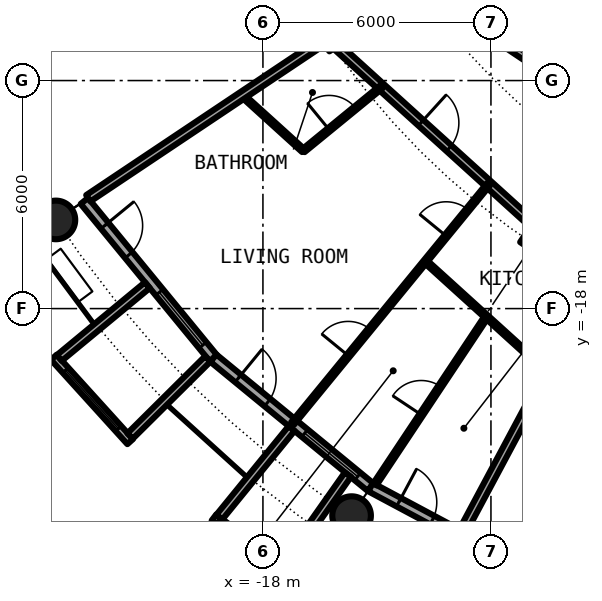
"""IFC4 building model, lengths in metres.
Left out: names, types, materials, properties, quantities, classifications, styles, units other than length and angle.
Written with IfcOpenShell. Run it as: python <this file> out.ifc"""

import sys

from ifc_helpers import new_model, si_unit, direction, frame, frame_2d, origin, origin_2d, place, context, subcontext, project, spatial, rectangle, circle, hollow_circle, i_section, extrude, element, fill, save


model = new_model("IFC4")
c1 = context("Model", 3, precision=1e-05, world=origin(), true_north=direction((0.0, 1.0)))
c2 = subcontext(c1, "Body", "Model", "MODEL_VIEW")
j1 = project(units=[si_unit("LENGTHUNIT", "METRE"), si_unit("PLANEANGLEUNIT", "RADIAN")], contexts=[c1])
p1 = place(None, origin())
s1 = spatial("IfcSite", under=j1, at=p1, CompositionType="ELEMENT")
p2 = place(p1, origin())
s2 = spatial("IfcBuilding", under=s1, at=p2, CompositionType="ELEMENT")
p3 = place(p2, frame((0.0, 0.0, 31.95)))
s3 = spatial("IfcBuildingStorey", under=s2, at=p3, CompositionType="ELEMENT", Elevation=31.95)
for number, where, z_axis, x_axis in (
    (1, (-23.448, -15.667, 0.0), (0.0, 0.0, 1.0), (1.0, 0.0, 0.0)),
    (2, (-15.667, -23.448, 0.0), (0.0, 0.0, 1.0), (1.0, 0.0, 0.0)),
):
    element("IfcColumn", number, at=place(p3, frame(where, z_axis=z_axis, x_axis=x_axis)), inside=s3, PredefinedType="COLUMN", context=c2, shape_type="SweptSolid", body=[
        extrude(hollow_circle(Radius=0.508, WallThickness=0.05, at=origin_2d()), origin(), (0.0, 0.0, 1.0), 3.05),
    ])
p4 = place(p3, frame((-10.889, -16.297, 0.0), z_axis=(0.0, 0.0, 1.0), x_axis=(-0.55557023302, -0.831469612303, 0.0)))
e3 = element("IfcColumn", 3, at=p4, inside=s3, PredefinedType="COLUMN", context=c2, shape_type="SweptSolid", body=[
    extrude(i_section(OverallWidth=0.305, OverallDepth=0.62, WebThickness=0.021, FlangeThickness=0.04, FilletRadius=0.027, at=origin_2d()), origin(), (0.0, 0.0, 1.0), 3.05),
])
p5 = place(p3, frame((-22.699, -15.167, 0.0), z_axis=(0.0, 0.0, 1.0), x_axis=(0.634382322723, -0.773019449054, 0.0)))
e4 = element("IfcWall", 4, at=p5, inside=s3, PredefinedType="SOLIDWALL", context=c2, shape_type="SweptSolid", body=[
    extrude(rectangle(XDim=5.352, YDim=0.25, at=frame_2d((2.676, 0.0))), origin(), (0.0, 0.0, 1.0), 2.7),
])
p6 = place(p5, frame((0.841, 0.0, 0.0)))
e5 = element("IfcOpeningElement", 5, at=p6, cuts=e4, PredefinedType="OPENING", context=c2, shape_type="SweptSolid", body=[
    extrude(rectangle(XDim=1.0, YDim=2.2, at=frame_2d((0.5, 1.1))), frame((0.0, 0.135, 0.0), z_axis=(0.0, -1.0, 0.0), x_axis=(1.0, 0.0, 0.0)), (0.0, 0.0, 1.0), 0.27),
])
p7 = place(p5, frame((3.111, 0.0, 0.3)))
e6 = element("IfcOpeningElement", 6, at=p7, cuts=e4, PredefinedType="OPENING", context=c2, shape_type="SweptSolid", body=[
    extrude(rectangle(XDim=1.8, YDim=2.1, at=frame_2d((0.9, 1.05))), frame((0.0, 0.135, 0.0), z_axis=(0.0, -1.0, 0.0), x_axis=(1.0, 0.0, 0.0)), (0.0, 0.0, 1.0), 0.27),
])
p8 = place(p3, frame((-23.503, -19.282, -0.03), z_axis=(0.0, 0.0, 1.0), x_axis=(0.671506829416, -0.740998365753, 0.0)))
e7 = element("IfcWall", 7, at=p8, inside=s3, PredefinedType="SOLIDWALL", context=c2, shape_type="SweptSolid", body=[
    extrude(rectangle(XDim=2.993, YDim=0.2, at=frame_2d((1.497, 0.0))), origin(), (0.0, 0.0, 1.0), 2.73),
])
p9 = place(p8, frame((0.457, 0.0, 0.33)))
e8 = element("IfcOpeningElement", 8, at=p9, cuts=e7, PredefinedType="OPENING", context=c2, shape_type="SweptSolid", body=[
    extrude(circle(Radius=1.04, at=frame_2d((1.04, 1.04))), frame((0.0, 0.11, 0.0), z_axis=(0.0, -1.0, 0.0), x_axis=(1.0, 0.0, 0.0)), (0.0, 0.0, 1.0), 0.22),
])
p10 = place(p3, frame((-21.041, -17.384, -0.03), z_axis=(0.0, 0.0, 1.0), x_axis=(-0.770784861449, -0.63709551667, 0.0)))
e9 = element("IfcWall", 9, at=p10, inside=s3, PredefinedType="SOLIDWALL", context=c2, shape_type="SweptSolid", body=[
    extrude(rectangle(XDim=3.006, YDim=0.2, at=frame_2d((1.503, 0.0))), origin(), (0.0, 0.0, 1.0), 2.73),
])
p11 = place(p3, frame((-19.45, -19.323, -0.03), z_axis=(0.0, 0.0, 1.0), x_axis=(-0.709727076896, -0.704476739375, 0.0)))
e10 = element("IfcWall", 10, at=p11, inside=s3, PredefinedType="SOLIDWALL", context=c2, shape_type="SweptSolid", body=[
    extrude(rectangle(XDim=2.883, YDim=0.2, at=frame_2d((1.441, 0.0))), origin(), (0.0, 0.0, 1.0), 2.73),
])
p12 = place(p3, frame((-19.304, -19.304, 0.0), z_axis=(0.0, 0.0, 1.0), x_axis=(0.773019449054, -0.634382322723, 0.0)))
e11 = element("IfcWall", 11, at=p12, inside=s3, PredefinedType="SOLIDWALL", context=c2, shape_type="SweptSolid", body=[
    extrude(rectangle(XDim=5.352, YDim=0.25, at=frame_2d((2.676, 0.0))), origin(), (0.0, 0.0, 1.0), 2.7),
])
p13 = place(p12, frame((0.841, 0.0, 0.0)))
e12 = element("IfcOpeningElement", 12, at=p13, cuts=e11, PredefinedType="OPENING", context=c2, shape_type="SweptSolid", body=[
    extrude(rectangle(XDim=1.0, YDim=2.2, at=frame_2d((0.5, 1.1))), frame((0.0, 0.135, 0.0), z_axis=(0.0, -1.0, 0.0), x_axis=(1.0, 0.0, 0.0)), (0.0, 0.0, 1.0), 0.27),
])
p14 = place(p12, frame((3.111, 0.0, 0.3)))
e13 = element("IfcOpeningElement", 13, at=p14, cuts=e11, PredefinedType="OPENING", context=c2, shape_type="SweptSolid", body=[
    extrude(rectangle(XDim=1.8, YDim=2.1, at=frame_2d((0.9, 1.05))), frame((0.0, 0.135, 0.0), z_axis=(0.0, -1.0, 0.0), x_axis=(1.0, 0.0, 0.0)), (0.0, 0.0, 1.0), 0.27),
])
p15 = place(p3, frame((-19.289, -23.497, -0.03), z_axis=(0.0, 0.0, 1.0), x_axis=(0.796842165306, -0.60418752353, 0.0)))
e14 = element("IfcWall", 14, at=p15, inside=s3, PredefinedType="SOLIDWALL", context=c2, shape_type="SweptSolid", body=[
    extrude(rectangle(XDim=2.337, YDim=0.2, at=frame_2d((1.168, 0.0))), origin(), (0.0, 0.0, 1.0), 2.73),
])
p16 = place(p15, frame((0.128, 0.0, 0.33)))
e15 = element("IfcOpeningElement", 15, at=p16, cuts=e14, PredefinedType="OPENING", context=c2, shape_type="SweptSolid", body=[
    extrude(circle(Radius=1.04, at=frame_2d((1.04, 1.04))), frame((0.0, 0.11, 0.0), z_axis=(0.0, -1.0, 0.0), x_axis=(1.0, 0.0, 0.0)), (0.0, 0.0, 1.0), 0.22),
])
p17 = place(p3, frame((-17.246, -21.155, -0.03), z_axis=(0.0, 0.0, 1.0), x_axis=(-0.631741648902, -0.775179004516, 0.0)))
e16 = element("IfcWall", 16, at=p17, inside=s3, PredefinedType="SOLIDWALL", context=c2, shape_type="SweptSolid", body=[
    extrude(rectangle(XDim=3.006, YDim=0.2, at=frame_2d((1.503, 0.0))), origin(), (0.0, 0.0, 1.0), 2.73),
])
p18 = place(p3, frame((-15.765, -22.37, -0.03), z_axis=(0.0, 0.0, 1.0), x_axis=(-0.576274612209, -0.817256123454, 0.0)))
e17 = element("IfcWall", 17, at=p18, inside=s3, PredefinedType="SOLIDWALL", context=c2, shape_type="SweptSolid", body=[
    extrude(rectangle(XDim=2.933, YDim=0.2, at=frame_2d((1.466, 0.0))), origin(), (0.0, 0.0, 1.0), 2.73),
])
p19 = place(p3, frame((-15.167, -22.699, 0.0), z_axis=(0.0, 0.0, 1.0), x_axis=(0.881915646801, -0.471407246368, 0.0)))
e18 = element("IfcWall", 18, at=p19, inside=s3, PredefinedType="SOLIDWALL", context=c2, shape_type="SweptSolid", body=[
    extrude(rectangle(XDim=5.352, YDim=0.25, at=frame_2d((2.676, 0.0))), origin(), (0.0, 0.0, 1.0), 2.7),
])
p20 = place(p19, frame((0.841, 0.0, 0.0)))
e19 = element("IfcOpeningElement", 19, at=p20, cuts=e18, PredefinedType="OPENING", context=c2, shape_type="SweptSolid", body=[
    extrude(rectangle(XDim=1.0, YDim=2.2, at=frame_2d((0.5, 1.1))), frame((0.0, 0.135, 0.0), z_axis=(0.0, -1.0, 0.0), x_axis=(1.0, 0.0, 0.0)), (0.0, 0.0, 1.0), 0.27),
])
p21 = place(p19, frame((3.111, 0.0, 0.3)))
e20 = element("IfcOpeningElement", 20, at=p21, cuts=e18, PredefinedType="OPENING", context=c2, shape_type="SweptSolid", body=[
    extrude(rectangle(XDim=1.8, YDim=2.1, at=frame_2d((0.9, 1.05))), frame((0.0, 0.135, 0.0), z_axis=(0.0, -1.0, 0.0), x_axis=(1.0, 0.0, 0.0)), (0.0, 0.0, 1.0), 0.27),
])
p22 = place(p3, frame((-18.542, -12.389, 0.0), z_axis=(0.0, 0.0, 1.0), x_axis=(0.740836325503, -0.671685595212, 0.0)))
e21 = element("IfcWall", 21, at=p22, inside=s3, PredefinedType="PARTITIONING", context=c2, shape_type="SweptSolid", body=[
    extrude(rectangle(XDim=2.168, YDim=0.1, at=frame_2d((1.084, 0.0))), origin(), (0.0, 0.0, 1.0), 2.7),
])
p23 = place(p3, frame((-13.727, -16.754, 0.0), z_axis=(0.0, 0.0, 1.0), x_axis=(0.740840803797, -0.671680655839, 0.0)))
e22 = element("IfcWall", 22, at=p23, inside=s3, PredefinedType="PARTITIONING", context=c2, shape_type="SweptSolid", body=[
    extrude(rectangle(XDim=4.338, YDim=0.1, at=frame_2d((2.169, 0.0))), origin(), (0.0, 0.0, 1.0), 2.7),
])
p24 = place(p3, frame((-16.18, -10.994, 0.0), z_axis=(0.0, 0.0, 1.0), x_axis=(0.74089212117, -0.671624050186, 0.0)))
e23 = element("IfcWall", 23, at=p24, inside=s3, PredefinedType="PARTITIONING", context=c2, shape_type="SweptSolid", body=[
    extrude(rectangle(XDim=9.368, YDim=0.2, at=frame_2d((4.684, 0.0))), origin(), (0.0, 0.0, 1.0), 2.38),
])
p25 = place(p24, frame((3.153, 0.0, 0.0)))
e24 = element("IfcOpeningElement", 24, at=p25, cuts=e23, PredefinedType="OPENING", context=c2, shape_type="SweptSolid", body=[
    extrude(rectangle(XDim=1.0, YDim=2.3, at=frame_2d((0.5, 1.15))), frame((0.0, 0.11, 0.0), z_axis=(0.0, -1.0, 0.0), x_axis=(1.0, 0.0, 0.0)), (0.0, 0.0, 1.0), 0.22),
])
p26 = place(p3, frame((-14.036, -9.402, 0.0), z_axis=(0.0, 0.0, 1.0), x_axis=(0.831561346449, -0.555432918625, 0.0)))
e25 = element("IfcWall", 25, at=p26, inside=s3, PredefinedType="PARTITIONING", context=c2, shape_type="SweptSolid", body=[
    extrude(rectangle(XDim=12.914, YDim=0.2, at=frame_2d((6.457, 0.0))), origin(), (0.0, 0.0, 1.0), 2.7),
])
p27 = place(p26, frame((7.566, 0.0, 0.0)))
e26 = element("IfcOpeningElement", 26, at=p27, cuts=e25, PredefinedType="OPENING", context=c2, shape_type="SweptSolid", body=[
    extrude(rectangle(XDim=1.0, YDim=2.3, at=frame_2d((0.5, 1.15))), frame((0.0, 0.11, 0.0), z_axis=(0.0, -1.0, 0.0), x_axis=(1.0, 0.0, 0.0)), (0.0, 0.0, 1.0), 0.22),
])
p28 = place(p3, frame((-22.595, -15.097, 0.0), z_axis=(0.0, 0.0, 1.0), x_axis=(0.831465568067, 0.555576285599, 0.0)))
e27 = element("IfcWall", 27, at=p28, inside=s3, PredefinedType="PARTITIONING", context=c2, shape_type="SweptSolid", body=[
    extrude(rectangle(XDim=7.264, YDim=0.2, at=frame_2d((3.632, 0.0))), origin(), (0.0, 0.0, 1.0), 2.7),
])
p29 = place(p3, frame((-17.219, -21.023, 0.0), z_axis=(0.0, 0.0, 1.0), x_axis=(0.633664062855, 0.773608334654, 0.0)))
e28 = element("IfcWall", 28, at=p29, inside=s3, PredefinedType="PARTITIONING", context=c2, shape_type="SweptSolid", body=[
    extrude(rectangle(XDim=8.138, YDim=0.1, at=frame_2d((4.069, 0.0))), origin(), (0.0, 0.0, 1.0), 2.7),
])
p30 = place(p29, frame((6.377, 0.0, 0.0)))
e29 = element("IfcOpeningElement", 29, at=p30, cuts=e28, PredefinedType="OPENING", context=c2, shape_type="SweptSolid", body=[
    extrude(rectangle(XDim=0.9, YDim=2.3, at=frame_2d((0.45, 1.15))), frame((0.0, 0.06, 0.0), z_axis=(0.0, -1.0, 0.0), x_axis=(1.0, 0.0, 0.0)), (0.0, 0.0, 1.0), 0.12),
])
p31 = place(p29, frame((2.308, 0.0, 0.0)))
e30 = element("IfcOpeningElement", 30, at=p31, cuts=e28, PredefinedType="OPENING", context=c2, shape_type="SweptSolid", body=[
    extrude(rectangle(XDim=0.9, YDim=2.3, at=frame_2d((0.45, 1.15))), frame((0.0, 0.06, 0.0), z_axis=(0.0, -1.0, 0.0), x_axis=(1.0, 0.0, 0.0)), (0.0, 0.0, 1.0), 0.12),
])
p32 = place(p3, frame((-16.936, -13.845, 0.0), z_axis=(0.0, 0.0, 1.0), x_axis=(0.774162545943, 0.632986850147, 0.0)))
e31 = element("IfcWall", 31, at=p32, inside=s3, PredefinedType="PARTITIONING", context=c2, shape_type="SweptSolid", body=[
    extrude(rectangle(XDim=2.649, YDim=0.1, at=frame_2d((1.325, 0.0))), origin(), (0.0, 0.0, 1.0), 2.7),
])
p33 = place(p32, frame((0.875, 0.0, 0.0)))
e32 = element("IfcOpeningElement", 32, at=p33, cuts=e31, PredefinedType="OPENING", context=c2, shape_type="SweptSolid", body=[
    extrude(rectangle(XDim=0.9, YDim=2.3, at=frame_2d((0.45, 1.15))), frame((0.0, 0.06, 0.0), z_axis=(0.0, -1.0, 0.0), x_axis=(1.0, 0.0, 0.0)), (0.0, 0.0, 1.0), 0.12),
])
p34 = place(p3, frame((-15.054, -22.624, 0.0), z_axis=(0.0, 0.0, 1.0), x_axis=(0.553913391217, 0.832574294, 0.0)))
e33 = element("IfcWall", 33, at=p34, inside=s3, PredefinedType="PARTITIONING", context=c2, shape_type="SweptSolid", body=[
    extrude(rectangle(XDim=5.301, YDim=0.1, at=frame_2d((2.65, 0.0))), origin(), (0.0, 0.0, 1.0), 2.7),
])
p35 = place(p34, frame((2.2, 0.0, 0.0)))
e34 = element("IfcOpeningElement", 34, at=p35, cuts=e33, PredefinedType="OPENING", context=c2, shape_type="SweptSolid", body=[
    extrude(rectangle(XDim=0.9, YDim=2.3, at=frame_2d((0.45, 1.15))), frame((0.0, 0.06, 0.0), z_axis=(0.0, -1.0, 0.0), x_axis=(1.0, 0.0, 0.0)), (0.0, 0.0, 1.0), 0.12),
])
p36 = place(p3, frame((-12.805, -23.968, 0.0), z_axis=(0.0, 0.0, 1.0), x_axis=(0.471173668908, 0.882040460369, 0.0)))
e35 = element("IfcWall", 35, at=p36, inside=s3, PredefinedType="PARTITIONING", context=c2, shape_type="SweptSolid", body=[
    extrude(rectangle(XDim=7.574, YDim=0.2, at=frame_2d((3.787, 0.0))), origin(), (0.0, 0.0, 1.0), 2.7),
])
p37 = place(p6, origin())
e36 = element("IfcDoor", 36, at=p37, inside=s3, OperationType="SINGLE_SWING_LEFT", PredefinedType="DOOR", context=c2, shape_type="SweptSolid", body=[
    extrude(rectangle(XDim=1.0, YDim=2.2, at=frame_2d((0.5, 1.1))), frame((0.0, 0.025, 0.0), z_axis=(0.0, -1.0, 0.0), x_axis=(1.0, 0.0, 0.0)), (0.0, 0.0, 1.0), 0.05),
])
fill(e5, e36)
p38 = place(p7, origin())
e37 = element("IfcWindow", 37, at=p38, inside=s3, PartitioningType="SINGLE_PANEL", PredefinedType="WINDOW", context=c2, shape_type="SweptSolid", body=[
    extrude(rectangle(XDim=1.8, YDim=2.1, at=frame_2d((0.9, 1.05))), frame((0.0, 0.03, 0.0), z_axis=(0.0, -1.0, 0.0), x_axis=(1.0, 0.0, 0.0)), (0.0, 0.0, 1.0), 0.06),
])
fill(e6, e37)
p39 = place(p9, origin())
e38 = element("IfcWindow", 38, at=p39, inside=s3, PartitioningType="SINGLE_PANEL", PredefinedType="WINDOW", context=c2, shape_type="SweptSolid", body=[
    extrude(circle(Radius=1.04, at=frame_2d((1.04, 1.04))), frame((0.0, 0.03, 0.0), z_axis=(0.0, -1.0, 0.0), x_axis=(1.0, 0.0, 0.0)), (0.0, 0.0, 1.0), 0.06),
])
fill(e8, e38)
p40 = place(p13, origin())
e39 = element("IfcDoor", 39, at=p40, inside=s3, OperationType="SINGLE_SWING_LEFT", PredefinedType="DOOR", context=c2, shape_type="SweptSolid", body=[
    extrude(rectangle(XDim=1.0, YDim=2.2, at=frame_2d((0.5, 1.1))), frame((0.0, 0.025, 0.0), z_axis=(0.0, -1.0, 0.0), x_axis=(1.0, 0.0, 0.0)), (0.0, 0.0, 1.0), 0.05),
])
fill(e12, e39)
p41 = place(p14, origin())
e40 = element("IfcWindow", 40, at=p41, inside=s3, PartitioningType="SINGLE_PANEL", PredefinedType="WINDOW", context=c2, shape_type="SweptSolid", body=[
    extrude(rectangle(XDim=1.8, YDim=2.1, at=frame_2d((0.9, 1.05))), frame((0.0, 0.03, 0.0), z_axis=(0.0, -1.0, 0.0), x_axis=(1.0, 0.0, 0.0)), (0.0, 0.0, 1.0), 0.06),
])
fill(e13, e40)
p42 = place(p16, origin())
e41 = element("IfcWindow", 41, at=p42, inside=s3, PartitioningType="SINGLE_PANEL", PredefinedType="WINDOW", context=c2, shape_type="SweptSolid", body=[
    extrude(circle(Radius=1.04, at=frame_2d((1.04, 1.04))), frame((0.0, 0.03, 0.0), z_axis=(0.0, -1.0, 0.0), x_axis=(1.0, 0.0, 0.0)), (0.0, 0.0, 1.0), 0.06),
])
fill(e15, e41)
p43 = place(p20, origin())
e42 = element("IfcDoor", 42, at=p43, inside=s3, OperationType="SINGLE_SWING_LEFT", PredefinedType="DOOR", context=c2, shape_type="SweptSolid", body=[
    extrude(rectangle(XDim=1.0, YDim=2.2, at=frame_2d((0.5, 1.1))), frame((0.0, 0.025, 0.0), z_axis=(0.0, -1.0, 0.0), x_axis=(1.0, 0.0, 0.0)), (0.0, 0.0, 1.0), 0.05),
])
fill(e19, e42)
p44 = place(p25, origin())
e43 = element("IfcDoor", 43, at=p44, inside=s3, OperationType="SINGLE_SWING_LEFT", PredefinedType="DOOR", context=c2, shape_type="SweptSolid", body=[
    extrude(rectangle(XDim=1.0, YDim=2.3, at=frame_2d((0.5, 1.15))), frame((0.0, 0.025, 0.0), z_axis=(0.0, -1.0, 0.0), x_axis=(1.0, 0.0, 0.0)), (0.0, 0.0, 1.0), 0.05),
])
fill(e24, e43)
p45 = place(p33, origin())
e44 = element("IfcDoor", 44, at=p45, inside=s3, OperationType="SINGLE_SWING_LEFT", PredefinedType="DOOR", context=c2, shape_type="SweptSolid", body=[
    extrude(rectangle(XDim=0.9, YDim=2.3, at=frame_2d((0.45, 1.15))), frame((0.0, 0.025, 0.0), z_axis=(0.0, -1.0, 0.0), x_axis=(1.0, 0.0, 0.0)), (0.0, 0.0, 1.0), 0.05),
])
fill(e32, e44)
p46 = place(p30, origin())
e45 = element("IfcDoor", 45, at=p46, inside=s3, OperationType="SINGLE_SWING_RIGHT", PredefinedType="DOOR", context=c2, shape_type="SweptSolid", body=[
    extrude(rectangle(XDim=0.9, YDim=2.3, at=frame_2d((0.45, 1.15))), frame((0.0, 0.025, 0.0), z_axis=(0.0, -1.0, 0.0), x_axis=(1.0, 0.0, 0.0)), (0.0, 0.0, 1.0), 0.05),
])
fill(e29, e45)
p47 = place(p31, origin())
e46 = element("IfcDoor", 46, at=p47, inside=s3, OperationType="SINGLE_SWING_LEFT", PredefinedType="DOOR", context=c2, shape_type="SweptSolid", body=[
    extrude(rectangle(XDim=0.9, YDim=2.3, at=frame_2d((0.45, 1.15))), frame((0.0, 0.025, 0.0), z_axis=(0.0, -1.0, 0.0), x_axis=(1.0, 0.0, 0.0)), (0.0, 0.0, 1.0), 0.05),
])
fill(e30, e46)
p48 = place(p35, origin())
e47 = element("IfcDoor", 47, at=p48, inside=s3, OperationType="SINGLE_SWING_RIGHT", PredefinedType="DOOR", context=c2, shape_type="SweptSolid", body=[
    extrude(rectangle(XDim=0.9, YDim=2.3, at=frame_2d((0.45, 1.15))), frame((0.0, 0.025, 0.0), z_axis=(0.0, -1.0, 0.0), x_axis=(1.0, 0.0, 0.0)), (0.0, 0.0, 1.0), 0.05),
])
fill(e34, e47)
save(model, sys.argv[1])
